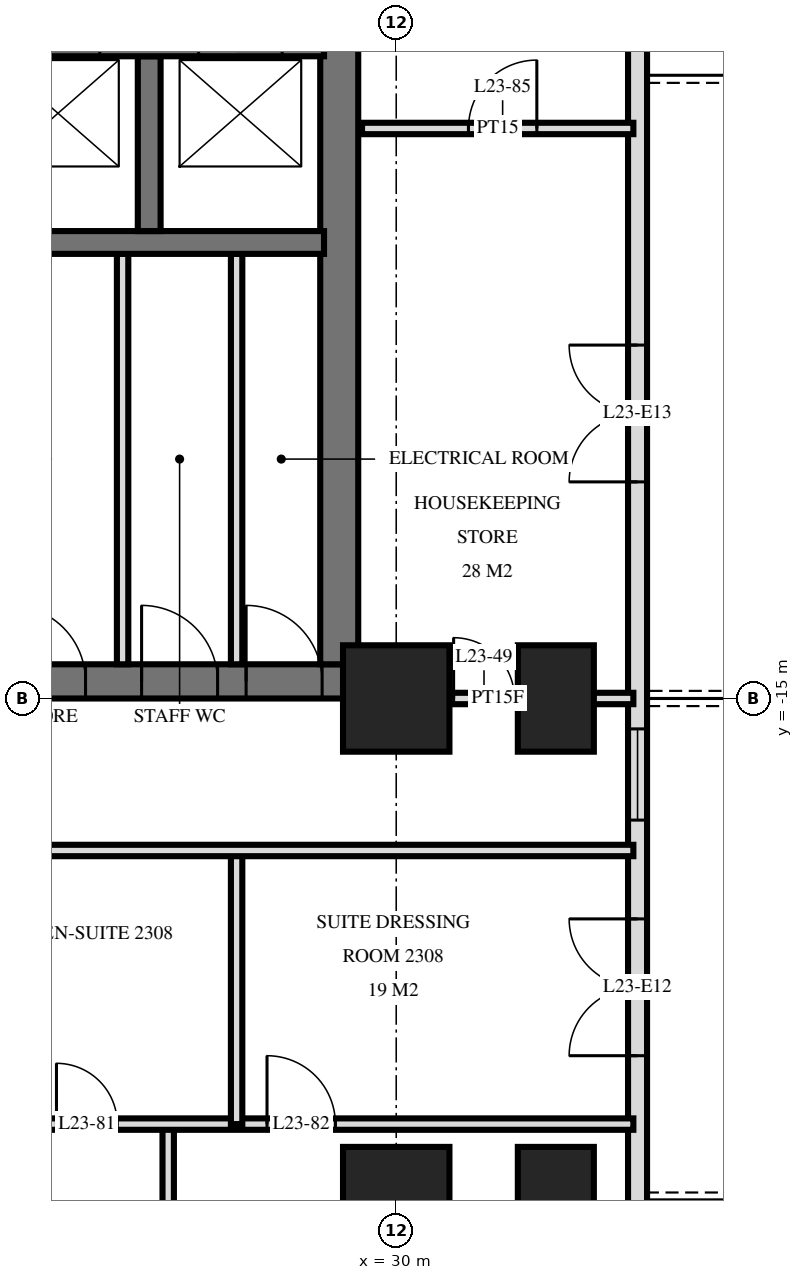
"""IFC4 building model, lengths in metres.
Left out: names, types, materials, properties, quantities, classifications, styles, units other than length and angle.
Written with IfcOpenShell. Run it as: python <this file> out.ifc"""

import sys

from ifc_helpers import new_model, si_unit, direction, frame, frame_2d, origin, origin_2d, place, context, subcontext, project, spatial, rectangle, extrude, element, fill, save


model = new_model("IFC4")
c1 = context("Model", 3, precision=1e-05, world=origin(), true_north=direction((0.0, 1.0)))
c2 = subcontext(c1, "Body", "Model", "MODEL_VIEW")
j1 = project(units=[si_unit("LENGTHUNIT", "METRE"), si_unit("PLANEANGLEUNIT", "RADIAN")], contexts=[c1])
p1 = place(None, origin())
s1 = spatial("IfcSite", under=j1, at=p1, CompositionType="ELEMENT")
p2 = place(p1, origin())
s2 = spatial("IfcBuilding", under=s1, at=p2, CompositionType="ELEMENT")
p3 = place(p2, frame((0.0, 0.0, 92.4)))
s3 = spatial("IfcBuildingStorey", under=s2, at=p3, CompositionType="ELEMENT", Elevation=92.4)
for number, where, z_axis, x_axis in (
    (1, (30.0, -21.6, 0.0), (0.0, 0.0, 1.0), (1.0, 0.0, 0.0)),
    (2, (30.0, -15.0, 0.0), (0.0, 0.0, 1.0), (1.0, 0.0, 0.0)),
):
    element("IfcColumn", number, at=place(p3, frame(where, z_axis=z_axis, x_axis=x_axis)), inside=s3, PredefinedType="COLUMN", context=c2, shape_type="SweptSolid", body=[
        extrude(rectangle(XDim=1.4, YDim=1.4, at=origin_2d()), origin(), (0.0, 0.0, 1.0), 3.6),
    ])
for number, where, z_axis, x_axis in (
    (3, (32.1, -21.6, 0.0), (0.0, 0.0, 1.0), (0.0, 1.0, 0.0)),
    (4, (32.1, -15.0, 0.0), (0.0, 0.0, 1.0), (0.0, 1.0, 0.0)),
):
    element("IfcColumn", number, at=place(p3, frame(where, z_axis=z_axis, x_axis=x_axis)), inside=s3, PredefinedType="COLUMN", context=c2, shape_type="SweptSolid", body=[
        extrude(rectangle(XDim=1.4, YDim=1.0, at=origin_2d()), origin(), (0.0, 0.0, 1.0), 3.6),
    ])
p4 = place(p3, frame((10.0, -14.775, 0.0), z_axis=(0.0, 0.0, 1.0), x_axis=(1.0, 0.0, 0.0)))
e5 = element("IfcWall", 5, at=p4, inside=s3, PredefinedType="SHEAR", context=c2, shape_type="SweptSolid", body=[
    extrude(rectangle(XDim=19.5, YDim=0.45, at=frame_2d((9.75, 0.0))), origin(), (0.0, 0.0, 1.0), 3.6),
])
p5 = place(p4, frame((7.1, 0.0, 0.0)))
e6 = element("IfcOpeningElement", 6, at=p5, cuts=e5, PredefinedType="OPENING", context=c2, shape_type="SweptSolid", body=[
    extrude(rectangle(XDim=1.2, YDim=2.1, at=frame_2d((0.6, 1.05))), frame((0.0, 0.235, 0.0), z_axis=(0.0, -1.0, 0.0), x_axis=(1.0, 0.0, 0.0)), (0.0, 0.0, 1.0), 0.47),
])
p6 = place(p4, frame((4.15, 0.0, 0.0)))
e7 = element("IfcOpeningElement", 7, at=p6, cuts=e5, PredefinedType="OPENING", context=c2, shape_type="SweptSolid", body=[
    extrude(rectangle(XDim=1.1, YDim=2.1, at=frame_2d((0.55, 1.05))), frame((0.0, 0.235, 0.0), z_axis=(0.0, -1.0, 0.0), x_axis=(1.0, 0.0, 0.0)), (0.0, 0.0, 1.0), 0.47),
])
p7 = place(p4, frame((10.1, 0.0, 0.0)))
e8 = element("IfcOpeningElement", 8, at=p7, cuts=e5, PredefinedType="OPENING", context=c2, shape_type="SweptSolid", body=[
    extrude(rectangle(XDim=0.9, YDim=2.1, at=frame_2d((0.45, 1.05))), frame((0.0, 0.235, 0.0), z_axis=(0.0, -1.0, 0.0), x_axis=(1.0, 0.0, 0.0)), (0.0, 0.0, 1.0), 0.47),
])
p8 = place(p4, frame((12.45, 0.0, 0.0)))
e9 = element("IfcOpeningElement", 9, at=p8, cuts=e5, PredefinedType="OPENING", context=c2, shape_type="SweptSolid", body=[
    extrude(rectangle(XDim=1.0, YDim=2.1, at=frame_2d((0.5, 1.05))), frame((0.0, 0.235, 0.0), z_axis=(0.0, -1.0, 0.0), x_axis=(1.0, 0.0, 0.0)), (0.0, 0.0, 1.0), 0.47),
])
p9 = place(p4, frame((14.913, 0.0, 0.0)))
e10 = element("IfcOpeningElement", 10, at=p9, cuts=e5, PredefinedType="OPENING", context=c2, shape_type="SweptSolid", body=[
    extrude(rectangle(XDim=1.0, YDim=2.1, at=frame_2d((0.5, 1.05))), frame((0.0, 0.235, 0.0), z_axis=(0.0, -1.0, 0.0), x_axis=(1.0, 0.0, 0.0)), (0.0, 0.0, 1.0), 0.47),
])
p10 = place(p4, frame((16.65, 0.0, 0.0)))
e11 = element("IfcOpeningElement", 11, at=p10, cuts=e5, PredefinedType="OPENING", context=c2, shape_type="SweptSolid", body=[
    extrude(rectangle(XDim=1.0, YDim=2.1, at=frame_2d((0.5, 1.05))), frame((0.0, 0.235, 0.0), z_axis=(0.0, -1.0, 0.0), x_axis=(1.0, 0.0, 0.0)), (0.0, 0.0, 1.0), 0.47),
])
p11 = place(p4, frame((18.025, 0.0, 0.0)))
e12 = element("IfcOpeningElement", 12, at=p11, cuts=e5, PredefinedType="OPENING", context=c2, shape_type="SweptSolid", body=[
    extrude(rectangle(XDim=1.0, YDim=2.1, at=frame_2d((0.5, 1.05))), frame((0.0, 0.235, 0.0), z_axis=(0.0, -1.0, 0.0), x_axis=(1.0, 0.0, 0.0)), (0.0, 0.0, 1.0), 0.47),
])
p12 = place(p3, frame((29.25, -14.55, 0.0), z_axis=(0.0, 0.0, 1.0), x_axis=(0.0, 1.0, 0.0)))
e13 = element("IfcWall", 13, at=p12, inside=s3, PredefinedType="SHEAR", context=c2, shape_type="SweptSolid", body=[
    extrude(rectangle(XDim=14.1, YDim=0.5, at=frame_2d((7.05, 0.0))), origin(), (0.0, 0.0, 1.0), 3.6),
])
p13 = place(p3, frame((10.35, -6.4, 0.0), z_axis=(0.0, 0.0, 1.0), x_axis=(1.0, 0.0, 0.0)))
e14 = element("IfcWall", 14, at=p13, inside=s3, PredefinedType="SHEAR", context=c2, shape_type="SweptSolid", body=[
    extrude(rectangle(XDim=18.7, YDim=0.3, at=frame_2d((9.35, 0.0))), origin(), (0.0, 0.0, 1.0), 3.6),
])
p14 = place(p13, frame((14.65, 0.0, 0.0)))
e15 = element("IfcOpeningElement", 15, at=p14, cuts=e14, PredefinedType="OPENING", context=c2, shape_type="SweptSolid", body=[
    extrude(rectangle(XDim=1.1, YDim=2.1, at=frame_2d((0.55, 1.05))), frame((0.0, 0.16, 0.0), z_axis=(0.0, -1.0, 0.0), x_axis=(1.0, 0.0, 0.0)), (0.0, 0.0, 1.0), 0.32),
])
p15 = place(p13, frame((17.05, 0.0, 0.0)))
e16 = element("IfcOpeningElement", 16, at=p15, cuts=e14, PredefinedType="OPENING", context=c2, shape_type="SweptSolid", body=[
    extrude(rectangle(XDim=1.1, YDim=2.1, at=frame_2d((0.55, 1.05))), frame((0.0, 0.16, 0.0), z_axis=(0.0, -1.0, 0.0), x_axis=(1.0, 0.0, 0.0)), (0.0, 0.0, 1.0), 0.32),
])
p16 = place(p13, frame((6.8, 0.0, 0.0)))
e17 = element("IfcOpeningElement", 17, at=p16, cuts=e14, PredefinedType="OPENING", context=c2, shape_type="SweptSolid", body=[
    extrude(rectangle(XDim=1.1, YDim=2.1, at=frame_2d((0.55, 1.05))), frame((0.0, 0.16, 0.0), z_axis=(0.0, -1.0, 0.0), x_axis=(1.0, 0.0, 0.0)), (0.0, 0.0, 1.0), 0.32),
])
p17 = place(p13, frame((12.1, 0.0, 0.0)))
e18 = element("IfcOpeningElement", 18, at=p17, cuts=e14, PredefinedType="OPENING", context=c2, shape_type="SweptSolid", body=[
    extrude(rectangle(XDim=1.0, YDim=2.1, at=frame_2d((0.5, 1.05))), frame((0.0, 0.16, 0.0), z_axis=(0.0, -1.0, 0.0), x_axis=(1.0, 0.0, 0.0)), (0.0, 0.0, 1.0), 0.32),
])
p18 = place(p3, frame((10.35, -9.0, 0.0), z_axis=(0.0, 0.0, 1.0), x_axis=(1.0, 0.0, 0.0)))
e19 = element("IfcWall", 19, at=p18, inside=s3, PredefinedType="SHEAR", context=c2, shape_type="SweptSolid", body=[
    extrude(rectangle(XDim=18.7, YDim=0.3, at=frame_2d((9.35, 0.0))), origin(), (0.0, 0.0, 1.0), 3.6),
])
p19 = place(p18, frame((3.8, 0.0, 0.0)))
e20 = element("IfcOpeningElement", 20, at=p19, cuts=e19, PredefinedType="OPENING", context=c2, shape_type="SweptSolid", body=[
    extrude(rectangle(XDim=1.1, YDim=2.1, at=frame_2d((0.55, 1.05))), frame((0.0, 0.16, 0.0), z_axis=(0.0, -1.0, 0.0), x_axis=(1.0, 0.0, 0.0)), (0.0, 0.0, 1.0), 0.32),
])
p20 = place(p3, frame((26.75, -8.85, 0.0), z_axis=(0.0, 0.0, 1.0), x_axis=(0.0, 1.0, 0.0)))
e21 = element("IfcWall", 21, at=p20, inside=s3, PredefinedType="SHEAR", context=c2, shape_type="SweptSolid", body=[
    extrude(rectangle(XDim=2.3, YDim=0.3, at=frame_2d((1.15, 0.0))), origin(), (0.0, 0.0, 1.0), 3.6),
])
p21 = place(p3, frame((33.175, -24.875, 0.0), z_axis=(0.0, 0.0, 1.0), x_axis=(0.0, 1.0, 0.0)))
e22 = element("IfcWall", 22, at=p21, inside=s3, PredefinedType="SOLIDWALL", context=c2, shape_type="SweptSolid", body=[
    extrude(rectangle(XDim=21.551, YDim=0.25, at=frame_2d((10.775, 0.0))), origin(), (0.0, 0.0, 1.0), 3.32),
])
p22 = place(p21, frame((0.575, 0.0, 0.0)))
e23 = element("IfcOpeningElement", 23, at=p22, cuts=e22, PredefinedType="OPENING", context=c2, shape_type="SweptSolid", body=[
    extrude(rectangle(XDim=1.8, YDim=2.4, at=frame_2d((0.9, 1.2))), frame((0.0, 0.135, 0.0), z_axis=(0.0, -1.0, 0.0), x_axis=(1.0, 0.0, 0.0)), (0.0, 0.0, 1.0), 0.27),
])
p23 = place(p21, frame((5.175, 0.0, 0.0)))
e24 = element("IfcOpeningElement", 24, at=p23, cuts=e22, PredefinedType="OPENING", context=c2, shape_type="SweptSolid", body=[
    extrude(rectangle(XDim=1.8, YDim=2.4, at=frame_2d((0.9, 1.2))), frame((0.0, 0.135, 0.0), z_axis=(0.0, -1.0, 0.0), x_axis=(1.0, 0.0, 0.0)), (0.0, 0.0, 1.0), 0.27),
])
p24 = place(p21, frame((8.275, 0.0, 0.3)))
e25 = element("IfcOpeningElement", 25, at=p24, cuts=e22, PredefinedType="OPENING", context=c2, shape_type="SweptSolid", body=[
    extrude(rectangle(XDim=1.2, YDim=2.1, at=frame_2d((0.6, 1.05))), frame((0.0, 0.135, 0.0), z_axis=(0.0, -1.0, 0.0), x_axis=(1.0, 0.0, 0.0)), (0.0, 0.0, 1.0), 0.27),
])
p25 = place(p21, frame((12.725, 0.0, 0.0)))
e26 = element("IfcOpeningElement", 26, at=p25, cuts=e22, PredefinedType="OPENING", context=c2, shape_type="SweptSolid", body=[
    extrude(rectangle(XDim=1.8, YDim=2.4, at=frame_2d((0.9, 1.2))), frame((0.0, 0.135, 0.0), z_axis=(0.0, -1.0, 0.0), x_axis=(1.0, 0.0, 0.0)), (0.0, 0.0, 1.0), 0.27),
])
for number, where, z_axis, x_axis in (
    (27, (26.4, -14.55, 0.0), (0.0, 0.0, 1.0), (0.0, 1.0, 0.0)),
    (28, (27.9, -14.55, 0.0), (0.0, 0.0, 1.0), (0.0, 1.0, 0.0)),
):
    element("IfcWall", number, at=place(p3, frame(where, z_axis=z_axis, x_axis=x_axis)), inside=s3, PredefinedType="PARTITIONING", context=c2, shape_type="SweptSolid", body=[
        extrude(rectangle(XDim=5.4, YDim=0.15, at=frame_2d((2.7, 0.0))), origin(), (0.0, 0.0, 1.0), 3.3),
    ])
p26 = place(p3, frame((27.9, -20.6, 0.0), z_axis=(0.0, 0.0, 1.0), x_axis=(0.0, 1.0, 0.0)))
e29 = element("IfcWall", 29, at=p26, inside=s3, PredefinedType="PARTITIONING", context=c2, shape_type="SweptSolid", body=[
    extrude(rectangle(XDim=3.6, YDim=0.15, at=frame_2d((1.8, 0.0))), origin(), (0.0, 0.0, 1.0), 3.32),
])
p27 = place(p3, frame((27.0, -29.22, 0.0), z_axis=(0.0, 0.0, 1.0), x_axis=(0.0, 1.0, 0.0)))
e30 = element("IfcWall", 30, at=p27, inside=s3, PredefinedType="PARTITIONING", context=c2, shape_type="SweptSolid", body=[
    extrude(rectangle(XDim=8.62, YDim=0.15, at=frame_2d((4.31, 0.0))), origin(), (0.0, 0.0, 1.0), 3.32),
])
p28 = place(p27, frame((3.77, 0.0, 0.0)))
e31 = element("IfcOpeningElement", 31, at=p28, cuts=e30, PredefinedType="OPENING", context=c2, shape_type="SweptSolid", body=[
    extrude(rectangle(XDim=0.9, YDim=2.1, at=frame_2d((0.45, 1.05))), frame((0.0, 0.085, 0.0), z_axis=(0.0, -1.0, 0.0), x_axis=(1.0, 0.0, 0.0)), (0.0, 0.0, 1.0), 0.17),
])
p29 = place(p3, frame((24.9, -20.6, 0.0), z_axis=(0.0, 0.0, 1.0), x_axis=(1.0, 0.0, 0.0)))
e32 = element("IfcWall", 32, at=p29, inside=s3, PredefinedType="PARTITIONING", context=c2, shape_type="SweptSolid", body=[
    extrude(rectangle(XDim=8.22, YDim=0.15, at=frame_2d((4.11, 0.0))), origin(), (0.0, 0.0, 1.0), 3.32),
])
p30 = place(p29, frame((0.63, 0.0, 0.0)))
e33 = element("IfcOpeningElement", 33, at=p30, cuts=e32, PredefinedType="OPENING", context=c2, shape_type="SweptSolid", body=[
    extrude(rectangle(XDim=0.8, YDim=2.1, at=frame_2d((0.4, 1.05))), frame((0.0, 0.085, 0.0), z_axis=(0.0, -1.0, 0.0), x_axis=(1.0, 0.0, 0.0)), (0.0, 0.0, 1.0), 0.17),
])
p31 = place(p29, frame((3.4, 0.0, 0.0)))
e34 = element("IfcOpeningElement", 34, at=p31, cuts=e32, PredefinedType="OPENING", context=c2, shape_type="SweptSolid", body=[
    extrude(rectangle(XDim=0.9, YDim=2.1, at=frame_2d((0.45, 1.05))), frame((0.0, 0.085, 0.0), z_axis=(0.0, -1.0, 0.0), x_axis=(1.0, 0.0, 0.0)), (0.0, 0.0, 1.0), 0.17),
])
p32 = place(p3, frame((-33.12, -17.0, 0.0), z_axis=(0.0, 0.0, 1.0), x_axis=(1.0, 0.0, 0.0)))
e35 = element("IfcWall", 35, at=p32, inside=s3, PredefinedType="PARTITIONING", context=c2, shape_type="SweptSolid", body=[
    extrude(rectangle(XDim=66.24, YDim=0.15, at=frame_2d((33.12, 0.0))), origin(), (0.0, 0.0, 1.0), 3.32),
])
p33 = place(p32, frame((16.27, 0.0, 0.0)))
e36 = element("IfcOpeningElement", 36, at=p33, cuts=e35, PredefinedType="OPENING", context=c2, shape_type="SweptSolid", body=[
    extrude(rectangle(XDim=1.0, YDim=2.1, at=frame_2d((0.5, 1.05))), frame((0.0, 0.085, 0.0), z_axis=(0.0, -1.0, 0.0), x_axis=(1.0, 0.0, 0.0)), (0.0, 0.0, 1.0), 0.17),
])
p34 = place(p32, frame((22.97, 0.0, 0.0)))
e37 = element("IfcOpeningElement", 37, at=p34, cuts=e35, PredefinedType="OPENING", context=c2, shape_type="SweptSolid", body=[
    extrude(rectangle(XDim=1.0, YDim=2.1, at=frame_2d((0.5, 1.05))), frame((0.0, 0.085, 0.0), z_axis=(0.0, -1.0, 0.0), x_axis=(1.0, 0.0, 0.0)), (0.0, 0.0, 1.0), 0.17),
])
p35 = place(p32, frame((34.42, 0.0, 0.0)))
e38 = element("IfcOpeningElement", 38, at=p35, cuts=e35, PredefinedType="OPENING", context=c2, shape_type="SweptSolid", body=[
    extrude(rectangle(XDim=1.0, YDim=2.1, at=frame_2d((0.5, 1.05))), frame((0.0, 0.085, 0.0), z_axis=(0.0, -1.0, 0.0), x_axis=(1.0, 0.0, 0.0)), (0.0, 0.0, 1.0), 0.17),
])
p36 = place(p32, frame((39.22, 0.0, 0.0)))
e39 = element("IfcOpeningElement", 39, at=p36, cuts=e35, PredefinedType="OPENING", context=c2, shape_type="SweptSolid", body=[
    extrude(rectangle(XDim=1.0, YDim=2.1, at=frame_2d((0.5, 1.05))), frame((0.0, 0.085, 0.0), z_axis=(0.0, -1.0, 0.0), x_axis=(1.0, 0.0, 0.0)), (0.0, 0.0, 1.0), 0.17),
])
p37 = place(p32, frame((42.27, 0.0, 0.0)))
e40 = element("IfcOpeningElement", 40, at=p37, cuts=e35, PredefinedType="OPENING", context=c2, shape_type="SweptSolid", body=[
    extrude(rectangle(XDim=1.0, YDim=2.1, at=frame_2d((0.5, 1.05))), frame((0.0, 0.085, 0.0), z_axis=(0.0, -1.0, 0.0), x_axis=(1.0, 0.0, 0.0)), (0.0, 0.0, 1.0), 0.17),
])
p38 = place(p32, frame((45.82, 0.0, 0.0)))
e41 = element("IfcOpeningElement", 41, at=p38, cuts=e35, PredefinedType="OPENING", context=c2, shape_type="SweptSolid", body=[
    extrude(rectangle(XDim=1.0, YDim=2.1, at=frame_2d((0.5, 1.05))), frame((0.0, 0.085, 0.0), z_axis=(0.0, -1.0, 0.0), x_axis=(1.0, 0.0, 0.0)), (0.0, 0.0, 1.0), 0.17),
])
p39 = place(p32, frame((13.42, 0.0, 0.0)))
e42 = element("IfcOpeningElement", 42, at=p39, cuts=e35, PredefinedType="OPENING", context=c2, shape_type="SweptSolid", body=[
    extrude(rectangle(XDim=1.0, YDim=2.1, at=frame_2d((0.5, 1.05))), frame((0.0, 0.085, 0.0), z_axis=(0.0, -1.0, 0.0), x_axis=(1.0, 0.0, 0.0)), (0.0, 0.0, 1.0), 0.17),
])
p40 = place(p32, frame((54.82, 0.0, 0.0)))
e43 = element("IfcOpeningElement", 43, at=p40, cuts=e35, PredefinedType="OPENING", context=c2, shape_type="SweptSolid", body=[
    extrude(rectangle(XDim=1.0, YDim=2.1, at=frame_2d((0.5, 1.05))), frame((0.0, 0.085, 0.0), z_axis=(0.0, -1.0, 0.0), x_axis=(1.0, 0.0, 0.0)), (0.0, 0.0, 1.0), 0.17),
])
p41 = place(p3, frame((29.55, -15.0, 0.0), z_axis=(0.0, 0.0, 1.0), x_axis=(1.0, 0.0, 0.0)))
e44 = element("IfcWall", 44, at=p41, inside=s3, PredefinedType="PARTITIONING", context=c2, shape_type="SweptSolid", body=[
    extrude(rectangle(XDim=3.57, YDim=0.15, at=frame_2d((1.785, 0.0))), origin(), (0.0, 0.0, 1.0), 3.32),
])
p42 = place(p41, frame((1.205, 0.0, 0.0)))
e45 = element("IfcOpeningElement", 45, at=p42, cuts=e44, PredefinedType="OPENING", context=c2, shape_type="SweptSolid", body=[
    extrude(rectangle(XDim=0.8, YDim=2.1, at=frame_2d((0.4, 1.05))), frame((0.0, 0.085, 0.0), z_axis=(0.0, -1.0, 0.0), x_axis=(1.0, 0.0, 0.0)), (0.0, 0.0, 1.0), 0.17),
])
p43 = place(p3, frame((29.55, -7.5, 0.0), z_axis=(0.0, 0.0, 1.0), x_axis=(1.0, 0.0, 0.0)))
e46 = element("IfcWall", 46, at=p43, inside=s3, PredefinedType="PARTITIONING", context=c2, shape_type="SweptSolid", body=[
    extrude(rectangle(XDim=3.57, YDim=0.15, at=frame_2d((1.785, 0.0))), origin(), (0.0, 0.0, 1.0), 3.32),
])
p44 = place(p43, frame((1.4, 0.0, 0.0)))
e47 = element("IfcOpeningElement", 47, at=p44, cuts=e46, PredefinedType="OPENING", context=c2, shape_type="SweptSolid", body=[
    extrude(rectangle(XDim=0.9, YDim=2.1, at=frame_2d((0.45, 1.05))), frame((0.0, 0.085, 0.0), z_axis=(0.0, -1.0, 0.0), x_axis=(1.0, 0.0, 0.0)), (0.0, 0.0, 1.0), 0.17),
])
p45 = place(p23, origin())
e48 = element("IfcDoor", 48, at=p45, inside=s3, OperationType="DOUBLE_DOOR_SINGLE_SWING", PredefinedType="DOOR", context=c2, shape_type="SweptSolid", body=[
    extrude(rectangle(XDim=1.8, YDim=2.4, at=frame_2d((0.9, 1.2))), frame((0.0, 0.025, 0.0), z_axis=(0.0, -1.0, 0.0), x_axis=(1.0, 0.0, 0.0)), (0.0, 0.0, 1.0), 0.05),
])
fill(e24, e48)
p46 = place(p24, origin())
e49 = element("IfcWindow", 49, at=p46, inside=s3, PartitioningType="SINGLE_PANEL", PredefinedType="WINDOW", context=c2, shape_type="SweptSolid", body=[
    extrude(rectangle(XDim=1.2, YDim=2.1, at=frame_2d((0.6, 1.05))), frame((0.0, 0.03, 0.0), z_axis=(0.0, -1.0, 0.0), x_axis=(1.0, 0.0, 0.0)), (0.0, 0.0, 1.0), 0.06),
])
fill(e25, e49)
p47 = place(p25, origin())
e50 = element("IfcDoor", 50, at=p47, inside=s3, OperationType="DOUBLE_DOOR_SINGLE_SWING", PredefinedType="DOOR", context=c2, shape_type="SweptSolid", body=[
    extrude(rectangle(XDim=1.8, YDim=2.4, at=frame_2d((0.9, 1.2))), frame((0.0, 0.025, 0.0), z_axis=(0.0, -1.0, 0.0), x_axis=(1.0, 0.0, 0.0)), (0.0, 0.0, 1.0), 0.05),
])
fill(e26, e50)
p48 = place(p9, origin())
e51 = element("IfcDoor", 51, at=p48, inside=s3, OperationType="SINGLE_SWING_RIGHT", PredefinedType="DOOR", context=c2, shape_type="SweptSolid", body=[
    extrude(rectangle(XDim=1.0, YDim=2.1, at=frame_2d((0.5, 1.05))), frame((0.0, 0.025, 0.0), z_axis=(0.0, -1.0, 0.0), x_axis=(1.0, 0.0, 0.0)), (0.0, 0.0, 1.0), 0.05),
])
fill(e10, e51)
p49 = place(p10, origin())
e52 = element("IfcDoor", 52, at=p49, inside=s3, OperationType="SINGLE_SWING_RIGHT", PredefinedType="DOOR", context=c2, shape_type="SweptSolid", body=[
    extrude(rectangle(XDim=1.0, YDim=2.1, at=frame_2d((0.5, 1.05))), frame((0.0, 0.025, 0.0), z_axis=(0.0, -1.0, 0.0), x_axis=(1.0, 0.0, 0.0)), (0.0, 0.0, 1.0), 0.05),
])
fill(e11, e52)
p50 = place(p11, origin())
e53 = element("IfcDoor", 53, at=p50, inside=s3, OperationType="SINGLE_SWING_RIGHT", PredefinedType="DOOR", context=c2, shape_type="SweptSolid", body=[
    extrude(rectangle(XDim=1.0, YDim=2.1, at=frame_2d((0.5, 1.05))), frame((0.0, 0.025, 0.0), z_axis=(0.0, -1.0, 0.0), x_axis=(1.0, 0.0, 0.0)), (0.0, 0.0, 1.0), 0.05),
])
fill(e12, e53)
p51 = place(p42, origin())
e54 = element("IfcDoor", 54, at=p51, inside=s3, OperationType="SINGLE_SWING_RIGHT", PredefinedType="DOOR", context=c2, shape_type="SweptSolid", body=[
    extrude(rectangle(XDim=0.8, YDim=2.1, at=frame_2d((0.4, 1.05))), frame((0.0, 0.025, 0.0), z_axis=(0.0, -1.0, 0.0), x_axis=(1.0, 0.0, 0.0)), (0.0, 0.0, 1.0), 0.05),
])
fill(e45, e54)
p52 = place(p30, origin())
e55 = element("IfcDoor", 55, at=p52, inside=s3, OperationType="SINGLE_SWING_RIGHT", PredefinedType="DOOR", context=c2, shape_type="SweptSolid", body=[
    extrude(rectangle(XDim=0.8, YDim=2.1, at=frame_2d((0.4, 1.05))), frame((0.0, 0.025, 0.0), z_axis=(0.0, -1.0, 0.0), x_axis=(1.0, 0.0, 0.0)), (0.0, 0.0, 1.0), 0.05),
])
fill(e33, e55)
p53 = place(p31, origin())
e56 = element("IfcDoor", 56, at=p53, inside=s3, OperationType="SINGLE_SWING_RIGHT", PredefinedType="DOOR", context=c2, shape_type="SweptSolid", body=[
    extrude(rectangle(XDim=0.9, YDim=2.1, at=frame_2d((0.45, 1.05))), frame((0.0, 0.025, 0.0), z_axis=(0.0, -1.0, 0.0), x_axis=(1.0, 0.0, 0.0)), (0.0, 0.0, 1.0), 0.05),
])
fill(e34, e56)
p54 = place(p44, origin())
e57 = element("IfcDoor", 57, at=p54, inside=s3, OperationType="SINGLE_SWING_LEFT", PredefinedType="DOOR", context=c2, shape_type="SweptSolid", body=[
    extrude(rectangle(XDim=0.9, YDim=2.1, at=frame_2d((0.45, 1.05))), frame((0.0, 0.025, 0.0), z_axis=(0.0, -1.0, 0.0), x_axis=(1.0, 0.0, 0.0)), (0.0, 0.0, 1.0), 0.05),
])
fill(e47, e57)
save(model, sys.argv[1])
